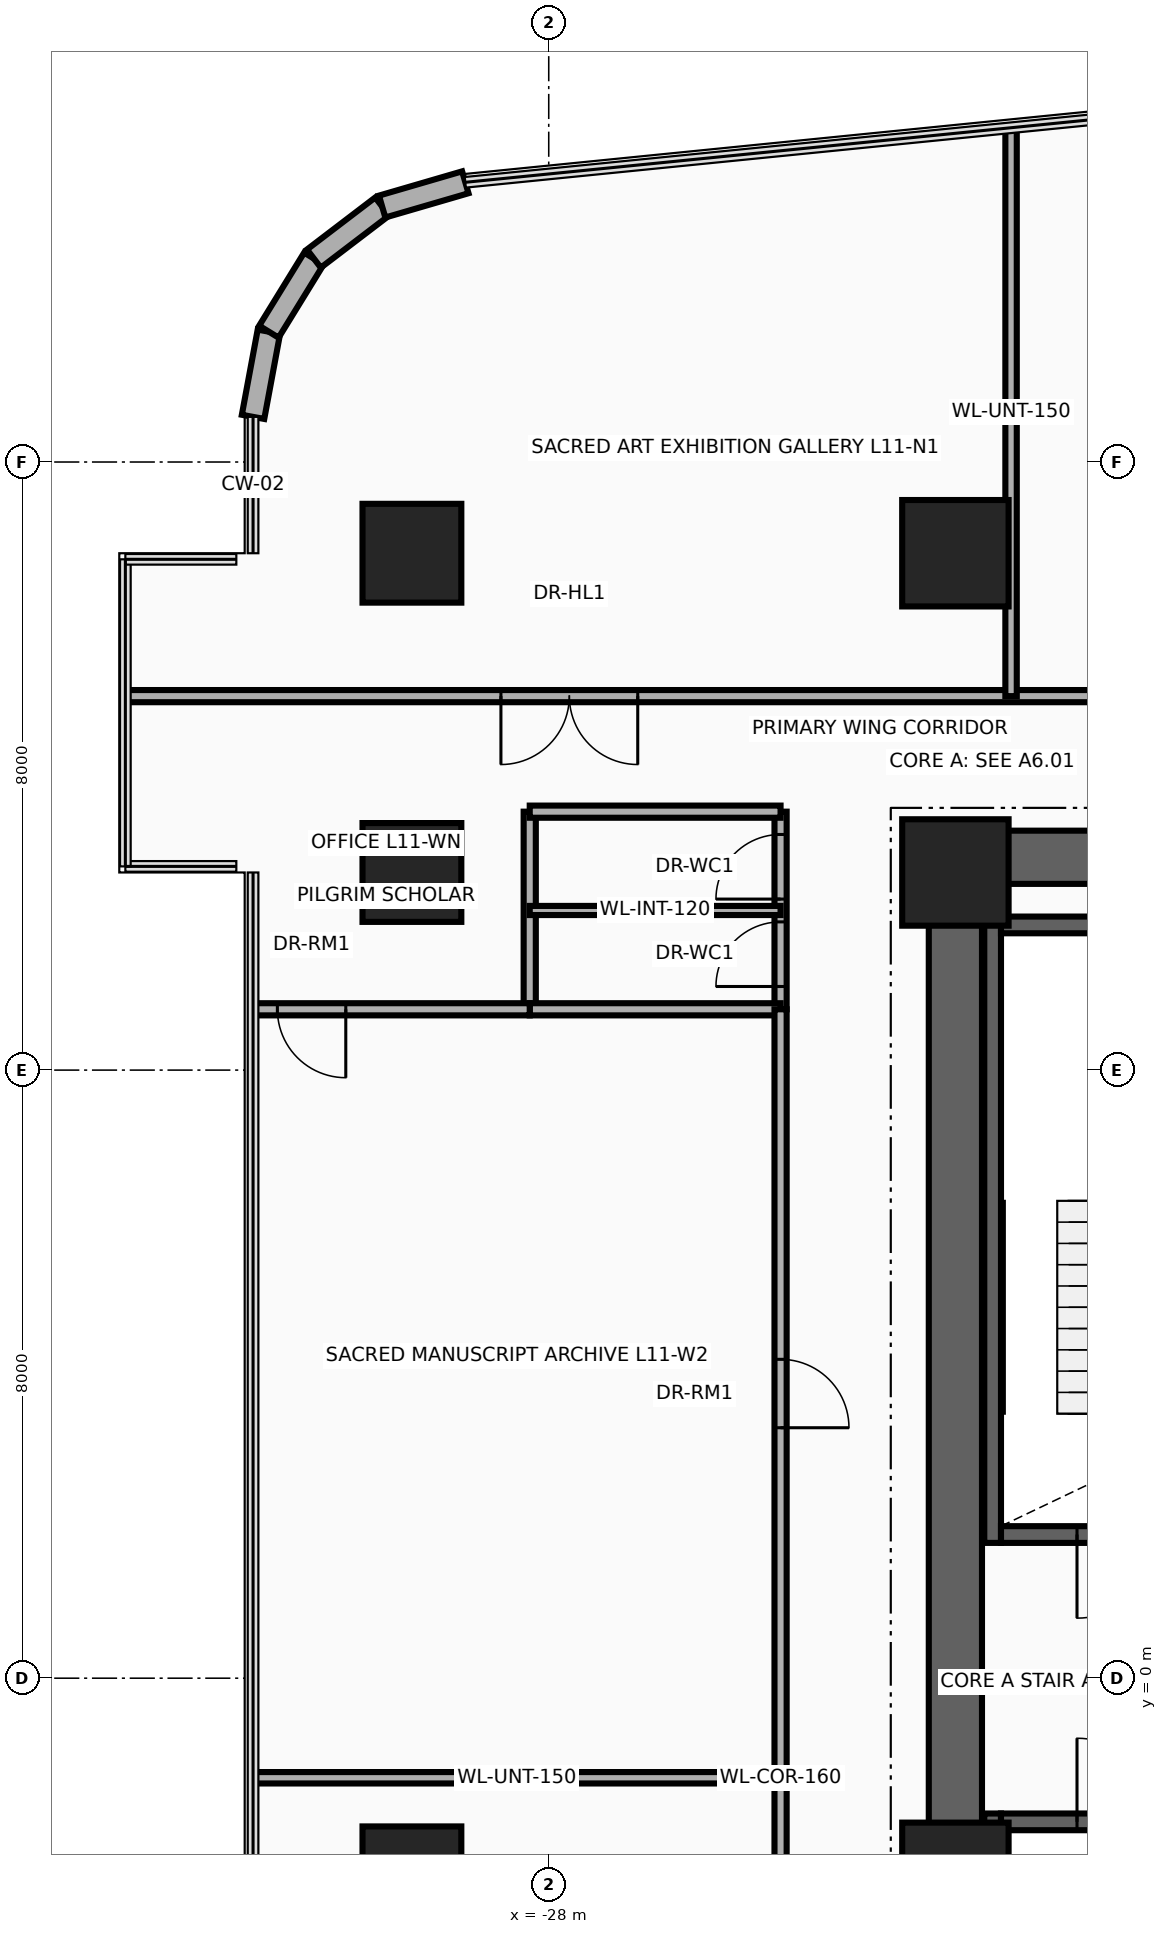
"""IFC4 building model, lengths in metres.
Left out: names, types, materials, properties, quantities, classifications, styles, units other than length and angle.
Written with IfcOpenShell. Run it as: python <this file> out.ifc"""

import sys

from ifc_helpers import new_model, si_unit, direction, frame, frame_2d, origin, origin_2d, place, context, subcontext, project, spatial, rectangle, circle, extrude, source, transform, mapped, element, fill, save


model = new_model("IFC4")
c1 = context("Model", 3, precision=1e-05, world=origin(), true_north=direction((0.0, 1.0)))
c2 = subcontext(c1, "Body", "Model", "MODEL_VIEW")
j1 = project(units=[si_unit("LENGTHUNIT", "METRE"), si_unit("PLANEANGLEUNIT", "RADIAN")], contexts=[c1])
p1 = place(None, origin())
s1 = spatial("IfcSite", under=j1, at=p1, CompositionType="ELEMENT")
p2 = place(p1, origin())
s2 = spatial("IfcBuilding", under=s1, at=p2, CompositionType="ELEMENT")
p3 = place(p2, frame((0.0, 0.0, 48.2)))
s3 = spatial("IfcBuildingStorey", under=s2, at=p3, CompositionType="ELEMENT", Elevation=48.2)
p4 = place(p3, frame((-22.16, 1.78, 0.0), z_axis=(0.0, 0.0, 1.0), x_axis=(0.0, 1.0, 0.0)))
e1 = element("IfcWall", 1, at=p4, inside=s3, PredefinedType="SHEAR", context=c2, shape_type="SweptSolid", body=[
    extrude(rectangle(XDim=8.67, YDim=0.22, at=frame_2d((4.335, 0.0))), origin(), (0.0, 0.0, 1.0), 3.46),
])
p5 = place(p3, frame((-22.05, 1.89, 0.0), z_axis=(0.0, 0.0, 1.0), x_axis=(1.0, 0.0, 0.0)))
e2 = element("IfcWall", 2, at=p5, inside=s3, PredefinedType="SHEAR", context=c2, shape_type="SweptSolid", body=[
    extrude(rectangle(XDim=3.11, YDim=0.22, at=frame_2d((1.555, 0.0))), origin(), (0.0, 0.0, 1.0), 3.46),
])
p6 = place(p5, frame((1.0, 0.0, 0.0)))
e3 = element("IfcOpeningElement", 3, at=p6, cuts=e2, PredefinedType="OPENING", context=c2, shape_type="SweptSolid", body=[
    extrude(rectangle(XDim=1.1, YDim=2.15, at=frame_2d((0.55, 1.075))), frame((0.0, 0.125, 0.0), z_axis=(0.0, -1.0, 0.0), x_axis=(1.0, 0.0, 0.0)), (0.0, 0.0, 1.0), 0.25),
])
p7 = place(p3, frame((-22.05, 9.91, 0.0), z_axis=(0.0, 0.0, 1.0), x_axis=(1.0, 0.0, 0.0)))
e4 = element("IfcWall", 4, at=p7, inside=s3, PredefinedType="SHEAR", context=c2, shape_type="SweptSolid", body=[
    extrude(rectangle(XDim=3.11, YDim=0.22, at=frame_2d((1.555, 0.0))), origin(), (0.0, 0.0, 1.0), 3.46),
])
p8 = place(p3, frame((-22.16, -10.45, 0.0), z_axis=(0.0, 0.0, 1.0), x_axis=(0.0, 1.0, 0.0)))
e5 = element("IfcWall", 5, at=p8, inside=s3, PredefinedType="SHEAR", context=c2, shape_type="SweptSolid", body=[
    extrude(rectangle(XDim=8.67, YDim=0.22, at=frame_2d((4.335, 0.0))), origin(), (0.0, 0.0, 1.0), 3.46),
])
p9 = place(p3, frame((-22.05, -1.89, 0.0), z_axis=(0.0, 0.0, 1.0), x_axis=(1.0, 0.0, 0.0)))
e6 = element("IfcWall", 6, at=p9, inside=s3, PredefinedType="SHEAR", context=c2, shape_type="SweptSolid", body=[
    extrude(rectangle(XDim=3.11, YDim=0.22, at=frame_2d((1.555, 0.0))), origin(), (0.0, 0.0, 1.0), 3.46),
])
p10 = place(p9, frame((1.0, 0.0, 0.0)))
e7 = element("IfcOpeningElement", 7, at=p10, cuts=e6, PredefinedType="OPENING", context=c2, shape_type="SweptSolid", body=[
    extrude(rectangle(XDim=1.1, YDim=2.15, at=frame_2d((0.55, 1.075))), frame((0.0, 0.125, 0.0), z_axis=(0.0, -1.0, 0.0), x_axis=(1.0, 0.0, 0.0)), (0.0, 0.0, 1.0), 0.25),
])
p11 = place(p3, frame((-22.65, -11.15, 0.0), z_axis=(0.0, 0.0, 1.0), x_axis=(0.0, 1.0, 0.0)))
e8 = element("IfcWall", 8, at=p11, inside=s3, PredefinedType="SHEAR", context=c2, shape_type="SweptSolid", body=[
    extrude(rectangle(XDim=22.3, YDim=0.7, at=frame_2d((11.15, 0.0))), origin(), (0.0, 0.0, 1.0), 3.46),
])
p12 = place(p3, frame((-22.65, 10.8, 0.0), z_axis=(0.0, 0.0, 1.0), x_axis=(1.0, 0.0, 0.0)))
e9 = element("IfcWall", 9, at=p12, inside=s3, PredefinedType="SHEAR", context=c2, shape_type="SweptSolid", body=[
    extrude(rectangle(XDim=10.25, YDim=0.7, at=frame_2d((5.125, 0.0))), origin(), (0.0, 0.0, 1.0), 3.46),
])
m1 = source(origin(), c2, "Body", "SweptSolid", [
    extrude(circle(Radius=0.65, at=origin_2d()), origin(), (0.0, 0.0, 1.0), 3.7),
])
p13 = place(p3, frame((-29.8, -2.6, 0.0), z_axis=(0.0, 0.0, 1.0), x_axis=(1.0, 0.0, 0.0)))
e10 = element("IfcColumn", 10, at=p13, inside=s3, PredefinedType="COLUMN", context=c2, shape_type="MappedRepresentation", body=[
    mapped(m1, transform((0.0, 0.0, 0.0), x_axis=(1.0, 0.0, 0.0), y_axis=(0.0, 1.0, 0.0), z_axis=(0.0, 0.0, 1.0), scale=1.0)),
])
m2 = source(origin(), c2, "Body", "SweptSolid", [
    extrude(rectangle(XDim=1.4, YDim=1.4, at=origin_2d()), origin(), (0.0, 0.0, 1.0), 3.7),
])
p14 = place(p3, frame((-22.65, -2.6, 0.0), z_axis=(0.0, 0.0, 1.0), x_axis=(1.0, 0.0, 0.0)))
e11 = element("IfcColumn", 11, at=p14, inside=s3, PredefinedType="COLUMN", context=c2, shape_type="MappedRepresentation", body=[
    mapped(m2, transform((0.0, 0.0, 0.0), x_axis=(1.0, 0.0, 0.0), y_axis=(0.0, 1.0, 0.0), z_axis=(0.0, 0.0, 1.0), scale=1.0)),
])
p15 = place(p3, frame((-29.8, 10.6, 0.0), z_axis=(0.0, 0.0, 1.0), x_axis=(1.0, 0.0, 0.0)))
e12 = element("IfcColumn", 12, at=p15, inside=s3, PredefinedType="COLUMN", context=c2, shape_type="MappedRepresentation", body=[
    mapped(m1, transform((0.0, 0.0, 0.0), x_axis=(1.0, 0.0, 0.0), y_axis=(0.0, 1.0, 0.0), z_axis=(0.0, 0.0, 1.0), scale=1.0)),
])
p16 = place(p3, frame((-22.65, 10.6, 0.0), z_axis=(0.0, 0.0, 1.0), x_axis=(1.0, 0.0, 0.0)))
e13 = element("IfcColumn", 13, at=p16, inside=s3, PredefinedType="COLUMN", context=c2, shape_type="MappedRepresentation", body=[
    mapped(m2, transform((0.0, 0.0, 0.0), x_axis=(1.0, 0.0, 0.0), y_axis=(0.0, 1.0, 0.0), z_axis=(0.0, 0.0, 1.0), scale=1.0)),
])
p17 = place(p3, frame((-29.8, 14.8, 0.0), z_axis=(0.0, 0.0, 1.0), x_axis=(1.0, 0.0, 0.0)))
e14 = element("IfcColumn", 14, at=p17, inside=s3, PredefinedType="COLUMN", context=c2, shape_type="MappedRepresentation", body=[
    mapped(m1, transform((0.0, 0.0, 0.0), x_axis=(1.0, 0.0, 0.0), y_axis=(0.0, 1.0, 0.0), z_axis=(0.0, 0.0, 1.0), scale=1.0)),
])
p18 = place(p3, frame((-22.65, 14.8, 0.0), z_axis=(0.0, 0.0, 1.0), x_axis=(1.0, 0.0, 0.0)))
e15 = element("IfcColumn", 15, at=p18, inside=s3, PredefinedType="COLUMN", context=c2, shape_type="MappedRepresentation", body=[
    mapped(m2, transform((0.0, 0.0, 0.0), x_axis=(1.0, 0.0, 0.0), y_axis=(0.0, 1.0, 0.0), z_axis=(0.0, 0.0, 1.0), scale=1.0)),
])
p19 = place(p3, frame((-31.89, 16.594, 0.0), z_axis=(0.0, 0.0, 1.0), x_axis=(0.182748995683, 0.9831596028, 0.0)))
e16 = element("IfcWall", 16, at=p19, inside=s3, PredefinedType="SOLIDWALL", context=c2, shape_type="SweptSolid", body=[
    extrude(rectangle(XDim=1.14, YDim=0.3, at=frame_2d((0.57, 0.0))), origin(), (0.0, 0.0, 1.0), 3.46),
])
p20 = place(p3, frame((-31.682, 17.714, 0.0), z_axis=(0.0, 0.0, 1.0), x_axis=(0.524157723014, 0.8516212077, 0.0)))
e17 = element("IfcWall", 17, at=p20, inside=s3, PredefinedType="SOLIDWALL", context=c2, shape_type="SweptSolid", body=[
    extrude(rectangle(XDim=1.129, YDim=0.3, at=frame_2d((0.565, 0.0))), origin(), (0.0, 0.0, 1.0), 3.46),
])
p21 = place(p3, frame((-31.09, 18.676, 0.0), z_axis=(0.0, 0.0, 1.0), x_axis=(0.795253002434, 0.606277710393, 0.0)))
e18 = element("IfcWall", 18, at=p21, inside=s3, PredefinedType="SOLIDWALL", context=c2, shape_type="SweptSolid", body=[
    extrude(rectangle(XDim=1.129, YDim=0.3, at=frame_2d((0.564, 0.0))), origin(), (0.0, 0.0, 1.0), 3.46),
])
p22 = place(p3, frame((-30.192, 19.361, 0.0), z_axis=(0.0, 0.0, 1.0), x_axis=(0.960071941549, 0.279753225271, 0.0)))
e19 = element("IfcWall", 19, at=p22, inside=s3, PredefinedType="SOLIDWALL", context=c2, shape_type="SweptSolid", body=[
    extrude(rectangle(XDim=1.14, YDim=0.3, at=frame_2d((0.57, 0.0))), origin(), (0.0, 0.0, 1.0), 3.46),
])
p23 = place(p3, frame((-28.25, 8.8, 0.0), z_axis=(0.0, 0.0, 1.0), x_axis=(0.0, 1.0, 0.0)))
e20 = element("IfcWall", 20, at=p23, inside=s3, PredefinedType="PARTITIONING", context=c2, shape_type="SweptSolid", body=[
    extrude(rectangle(XDim=2.6, YDim=0.16, at=frame_2d((1.3, 0.0))), origin(), (0.0, 0.0, 1.0), 2.583),
])
p24 = place(p3, frame((-24.95, 8.8, 0.0), z_axis=(0.0, 0.0, 1.0), x_axis=(0.0, 1.0, 0.0)))
e21 = element("IfcWall", 21, at=p24, inside=s3, PredefinedType="PARTITIONING", context=c2, shape_type="SweptSolid", body=[
    extrude(rectangle(XDim=2.6, YDim=0.16, at=frame_2d((1.3, 0.0))), origin(), (0.0, 0.0, 1.0), 2.583),
])
p25 = place(p24, frame((0.3, 0.0, 0.0)))
e22 = element("IfcOpeningElement", 22, at=p25, cuts=e21, PredefinedType="OPENING", context=c2, shape_type="SweptSolid", body=[
    extrude(rectangle(XDim=0.85, YDim=2.1, at=frame_2d((0.425, 1.05))), frame((0.0, 0.095, 0.0), z_axis=(0.0, -1.0, 0.0), x_axis=(1.0, 0.0, 0.0)), (0.0, 0.0, 1.0), 0.19),
])
p26 = place(p24, frame((1.45, 0.0, 0.0)))
e23 = element("IfcOpeningElement", 23, at=p26, cuts=e21, PredefinedType="OPENING", context=c2, shape_type="SweptSolid", body=[
    extrude(rectangle(XDim=0.85, YDim=2.1, at=frame_2d((0.425, 1.05))), frame((0.0, 0.095, 0.0), z_axis=(0.0, -1.0, 0.0), x_axis=(1.0, 0.0, 0.0)), (0.0, 0.0, 1.0), 0.19),
])
for number, where, z_axis, x_axis in (
    (24, (-28.25, 8.8, 0.0), (0.0, 0.0, 1.0), (1.0, 0.0, 0.0)),
    (25, (-28.25, 11.4, 0.0), (0.0, 0.0, 1.0), (1.0, 0.0, 0.0)),
):
    element("IfcWall", number, at=place(p3, frame(where, z_axis=z_axis, x_axis=x_axis)), inside=s3, PredefinedType="PARTITIONING", context=c2, shape_type="SweptSolid", body=[
        extrude(rectangle(XDim=3.3, YDim=0.16, at=frame_2d((1.65, 0.0))), origin(), (0.0, 0.0, 1.0), 3.46),
    ])
p27 = place(p3, frame((-28.25, 10.1, 0.0), z_axis=(0.0, 0.0, 1.0), x_axis=(1.0, 0.0, 0.0)))
e26 = element("IfcWall", 26, at=p27, inside=s3, PredefinedType="PARTITIONING", context=c2, shape_type="SweptSolid", body=[
    extrude(rectangle(XDim=3.3, YDim=0.12, at=frame_2d((1.65, 0.0))), origin(), (0.0, 0.0, 1.0), 3.46),
])
p28 = place(p3, frame((-24.95, -11.42, 0.0), z_axis=(0.0, 0.0, 1.0), x_axis=(0.0, 1.0, 0.0)))
e27 = element("IfcWall", 27, at=p28, inside=s3, PredefinedType="PARTITIONING", context=c2, shape_type="SweptSolid", body=[
    extrude(rectangle(XDim=20.22, YDim=0.16, at=frame_2d((10.11, 0.0))), origin(), (0.0, 0.0, 1.0), 2.583),
])
p29 = place(p28, frame((4.155, 0.0, 0.0)))
e28 = element("IfcOpeningElement", 28, at=p29, cuts=e27, PredefinedType="OPENING", context=c2, shape_type="SweptSolid", body=[
    extrude(rectangle(XDim=1.8, YDim=2.15, at=frame_2d((0.9, 1.075))), frame((0.0, 0.095, 0.0), z_axis=(0.0, -1.0, 0.0), x_axis=(1.0, 0.0, 0.0)), (0.0, 0.0, 1.0), 0.19),
])
p30 = place(p28, frame((14.715, 0.0, 0.0)))
e29 = element("IfcOpeningElement", 29, at=p30, cuts=e27, PredefinedType="OPENING", context=c2, shape_type="SweptSolid", body=[
    extrude(rectangle(XDim=0.9, YDim=2.1, at=frame_2d((0.45, 1.05))), frame((0.0, 0.095, 0.0), z_axis=(0.0, -1.0, 0.0), x_axis=(1.0, 0.0, 0.0)), (0.0, 0.0, 1.0), 0.19),
])
p31 = place(p3, frame((-31.89, 8.8, 0.0), z_axis=(0.0, 0.0, 1.0), x_axis=(1.0, 0.0, 0.0)))
e30 = element("IfcWall", 30, at=p31, inside=s3, PredefinedType="PARTITIONING", context=c2, shape_type="SweptSolid", body=[
    extrude(rectangle(XDim=3.64, YDim=0.16, at=frame_2d((1.82, 0.0))), origin(), (0.0, 0.0, 1.0), 2.896),
])
p32 = place(p31, frame((0.32, 0.0, 0.0)))
e31 = element("IfcOpeningElement", 31, at=p32, cuts=e30, PredefinedType="OPENING", context=c2, shape_type="SweptSolid", body=[
    extrude(rectangle(XDim=0.9, YDim=2.1, at=frame_2d((0.45, 1.05))), frame((0.0, 0.095, 0.0), z_axis=(0.0, -1.0, 0.0), x_axis=(1.0, 0.0, 0.0)), (0.0, 0.0, 1.0), 0.19),
])
p33 = place(p3, frame((-31.89, -1.31, 0.0), z_axis=(0.0, 0.0, 1.0), x_axis=(1.0, 0.0, 0.0)))
e32 = element("IfcWall", 32, at=p33, inside=s3, PredefinedType="PARTITIONING", context=c2, shape_type="SweptSolid", body=[
    extrude(rectangle(XDim=6.94, YDim=0.15, at=frame_2d((3.47, 0.0))), origin(), (0.0, 0.0, 1.0), 2.896),
])
p34 = place(p3, frame((-33.54, 12.92, 0.0), z_axis=(0.0, 0.0, 1.0), x_axis=(1.0, 0.0, 0.0)))
e33 = element("IfcWall", 33, at=p34, inside=s3, PredefinedType="PARTITIONING", context=c2, shape_type="SweptSolid", body=[
    extrude(rectangle(XDim=47.09, YDim=0.16, at=frame_2d((23.545, 0.0))), origin(), (0.0, 0.0, 1.0), 2.583),
])
p35 = place(p34, frame((4.911, 0.0, 0.0)))
e34 = element("IfcOpeningElement", 34, at=p35, cuts=e33, PredefinedType="OPENING", context=c2, shape_type="SweptSolid", body=[
    extrude(rectangle(XDim=1.8, YDim=2.15, at=frame_2d((0.9, 1.075))), frame((0.0, 0.095, 0.0), z_axis=(0.0, -1.0, 0.0), x_axis=(1.0, 0.0, 0.0)), (0.0, 0.0, 1.0), 0.19),
])
p36 = place(p34, frame((16.634, 0.0, 0.0)))
e35 = element("IfcOpeningElement", 35, at=p36, cuts=e33, PredefinedType="OPENING", context=c2, shape_type="SweptSolid", body=[
    extrude(rectangle(XDim=1.8, YDim=2.15, at=frame_2d((0.9, 1.075))), frame((0.0, 0.095, 0.0), z_axis=(0.0, -1.0, 0.0), x_axis=(1.0, 0.0, 0.0)), (0.0, 0.0, 1.0), 0.19),
])
p37 = place(p34, frame((27.285, 0.0, 0.0)))
e36 = element("IfcOpeningElement", 36, at=p37, cuts=e33, PredefinedType="OPENING", context=c2, shape_type="SweptSolid", body=[
    extrude(rectangle(XDim=1.8, YDim=2.15, at=frame_2d((0.9, 1.075))), frame((0.0, 0.095, 0.0), z_axis=(0.0, -1.0, 0.0), x_axis=(1.0, 0.0, 0.0)), (0.0, 0.0, 1.0), 0.19),
])
p38 = place(p34, frame((40.279, 0.0, 0.0)))
e37 = element("IfcOpeningElement", 37, at=p38, cuts=e33, PredefinedType="OPENING", context=c2, shape_type="SweptSolid", body=[
    extrude(rectangle(XDim=1.8, YDim=2.15, at=frame_2d((0.9, 1.075))), frame((0.0, 0.095, 0.0), z_axis=(0.0, -1.0, 0.0), x_axis=(1.0, 0.0, 0.0)), (0.0, 0.0, 1.0), 0.19),
])
p39 = place(p3, frame((-21.917, 12.92, 0.0), z_axis=(0.0, 0.0, 1.0), x_axis=(0.0, 1.0, 0.0)))
e38 = element("IfcWall", 38, at=p39, inside=s3, PredefinedType="PARTITIONING", context=c2, shape_type="SweptSolid", body=[
    extrude(rectangle(XDim=7.478, YDim=0.15, at=frame_2d((3.739, 0.0))), origin(), (0.0, 0.0, 1.0), 2.583),
])
p40 = place(p6, frame((1.1, 0.0, 0.0), z_axis=(0.0, 0.0, 1.0), x_axis=(-1.0, 0.0, 0.0)))
e39 = element("IfcDoor", 39, at=p40, inside=s3, OperationType="SINGLE_SWING_LEFT", PredefinedType="DOOR", context=c2, shape_type="SweptSolid", body=[
    extrude(rectangle(XDim=1.1, YDim=2.15, at=frame_2d((0.55, 1.075))), frame((0.0, 0.025, 0.0), z_axis=(0.0, -1.0, 0.0), x_axis=(1.0, 0.0, 0.0)), (0.0, 0.0, 1.0), 0.05),
])
fill(e3, e39)
p41 = place(p10, origin())
e40 = element("IfcDoor", 40, at=p41, inside=s3, OperationType="SINGLE_SWING_RIGHT", PredefinedType="DOOR", context=c2, shape_type="SweptSolid", body=[
    extrude(rectangle(XDim=1.1, YDim=2.15, at=frame_2d((0.55, 1.075))), frame((0.0, 0.025, 0.0), z_axis=(0.0, -1.0, 0.0), x_axis=(1.0, 0.0, 0.0)), (0.0, 0.0, 1.0), 0.05),
])
fill(e7, e40)
p42 = place(p25, origin())
e41 = element("IfcDoor", 41, at=p42, inside=s3, OperationType="SINGLE_SWING_LEFT", PredefinedType="DOOR", context=c2, shape_type="SweptSolid", body=[
    extrude(rectangle(XDim=0.85, YDim=2.1, at=frame_2d((0.425, 1.05))), frame((0.0, 0.025, 0.0), z_axis=(0.0, -1.0, 0.0), x_axis=(1.0, 0.0, 0.0)), (0.0, 0.0, 1.0), 0.05),
])
fill(e22, e41)
p43 = place(p26, origin())
e42 = element("IfcDoor", 42, at=p43, inside=s3, OperationType="SINGLE_SWING_RIGHT", PredefinedType="DOOR", context=c2, shape_type="SweptSolid", body=[
    extrude(rectangle(XDim=0.85, YDim=2.1, at=frame_2d((0.425, 1.05))), frame((0.0, 0.025, 0.0), z_axis=(0.0, -1.0, 0.0), x_axis=(1.0, 0.0, 0.0)), (0.0, 0.0, 1.0), 0.05),
])
fill(e23, e42)
p44 = place(p32, frame((0.9, 0.0, 0.0), z_axis=(0.0, 0.0, 1.0), x_axis=(-1.0, 0.0, 0.0)))
e43 = element("IfcDoor", 43, at=p44, inside=s3, OperationType="SINGLE_SWING_LEFT", PredefinedType="DOOR", context=c2, shape_type="SweptSolid", body=[
    extrude(rectangle(XDim=0.9, YDim=2.1, at=frame_2d((0.45, 1.05))), frame((0.0, 0.025, 0.0), z_axis=(0.0, -1.0, 0.0), x_axis=(1.0, 0.0, 0.0)), (0.0, 0.0, 1.0), 0.05),
])
fill(e31, e43)
p45 = place(p30, frame((0.9, 0.0, 0.0), z_axis=(0.0, 0.0, 1.0), x_axis=(-1.0, 0.0, 0.0)))
e44 = element("IfcDoor", 44, at=p45, inside=s3, OperationType="SINGLE_SWING_LEFT", PredefinedType="DOOR", context=c2, shape_type="SweptSolid", body=[
    extrude(rectangle(XDim=0.9, YDim=2.1, at=frame_2d((0.45, 1.05))), frame((0.0, 0.025, 0.0), z_axis=(0.0, -1.0, 0.0), x_axis=(1.0, 0.0, 0.0)), (0.0, 0.0, 1.0), 0.05),
])
fill(e29, e44)
p46 = place(p35, frame((1.8, 0.0, 0.0), z_axis=(0.0, 0.0, 1.0), x_axis=(-1.0, 0.0, 0.0)))
e45 = element("IfcDoor", 45, at=p46, inside=s3, OperationType="DOUBLE_DOOR_SINGLE_SWING", PredefinedType="DOOR", context=c2, shape_type="SweptSolid", body=[
    extrude(rectangle(XDim=1.8, YDim=2.15, at=frame_2d((0.9, 1.075))), frame((0.0, 0.025, 0.0), z_axis=(0.0, -1.0, 0.0), x_axis=(1.0, 0.0, 0.0)), (0.0, 0.0, 1.0), 0.05),
])
fill(e34, e45)
save(model, sys.argv[1])
